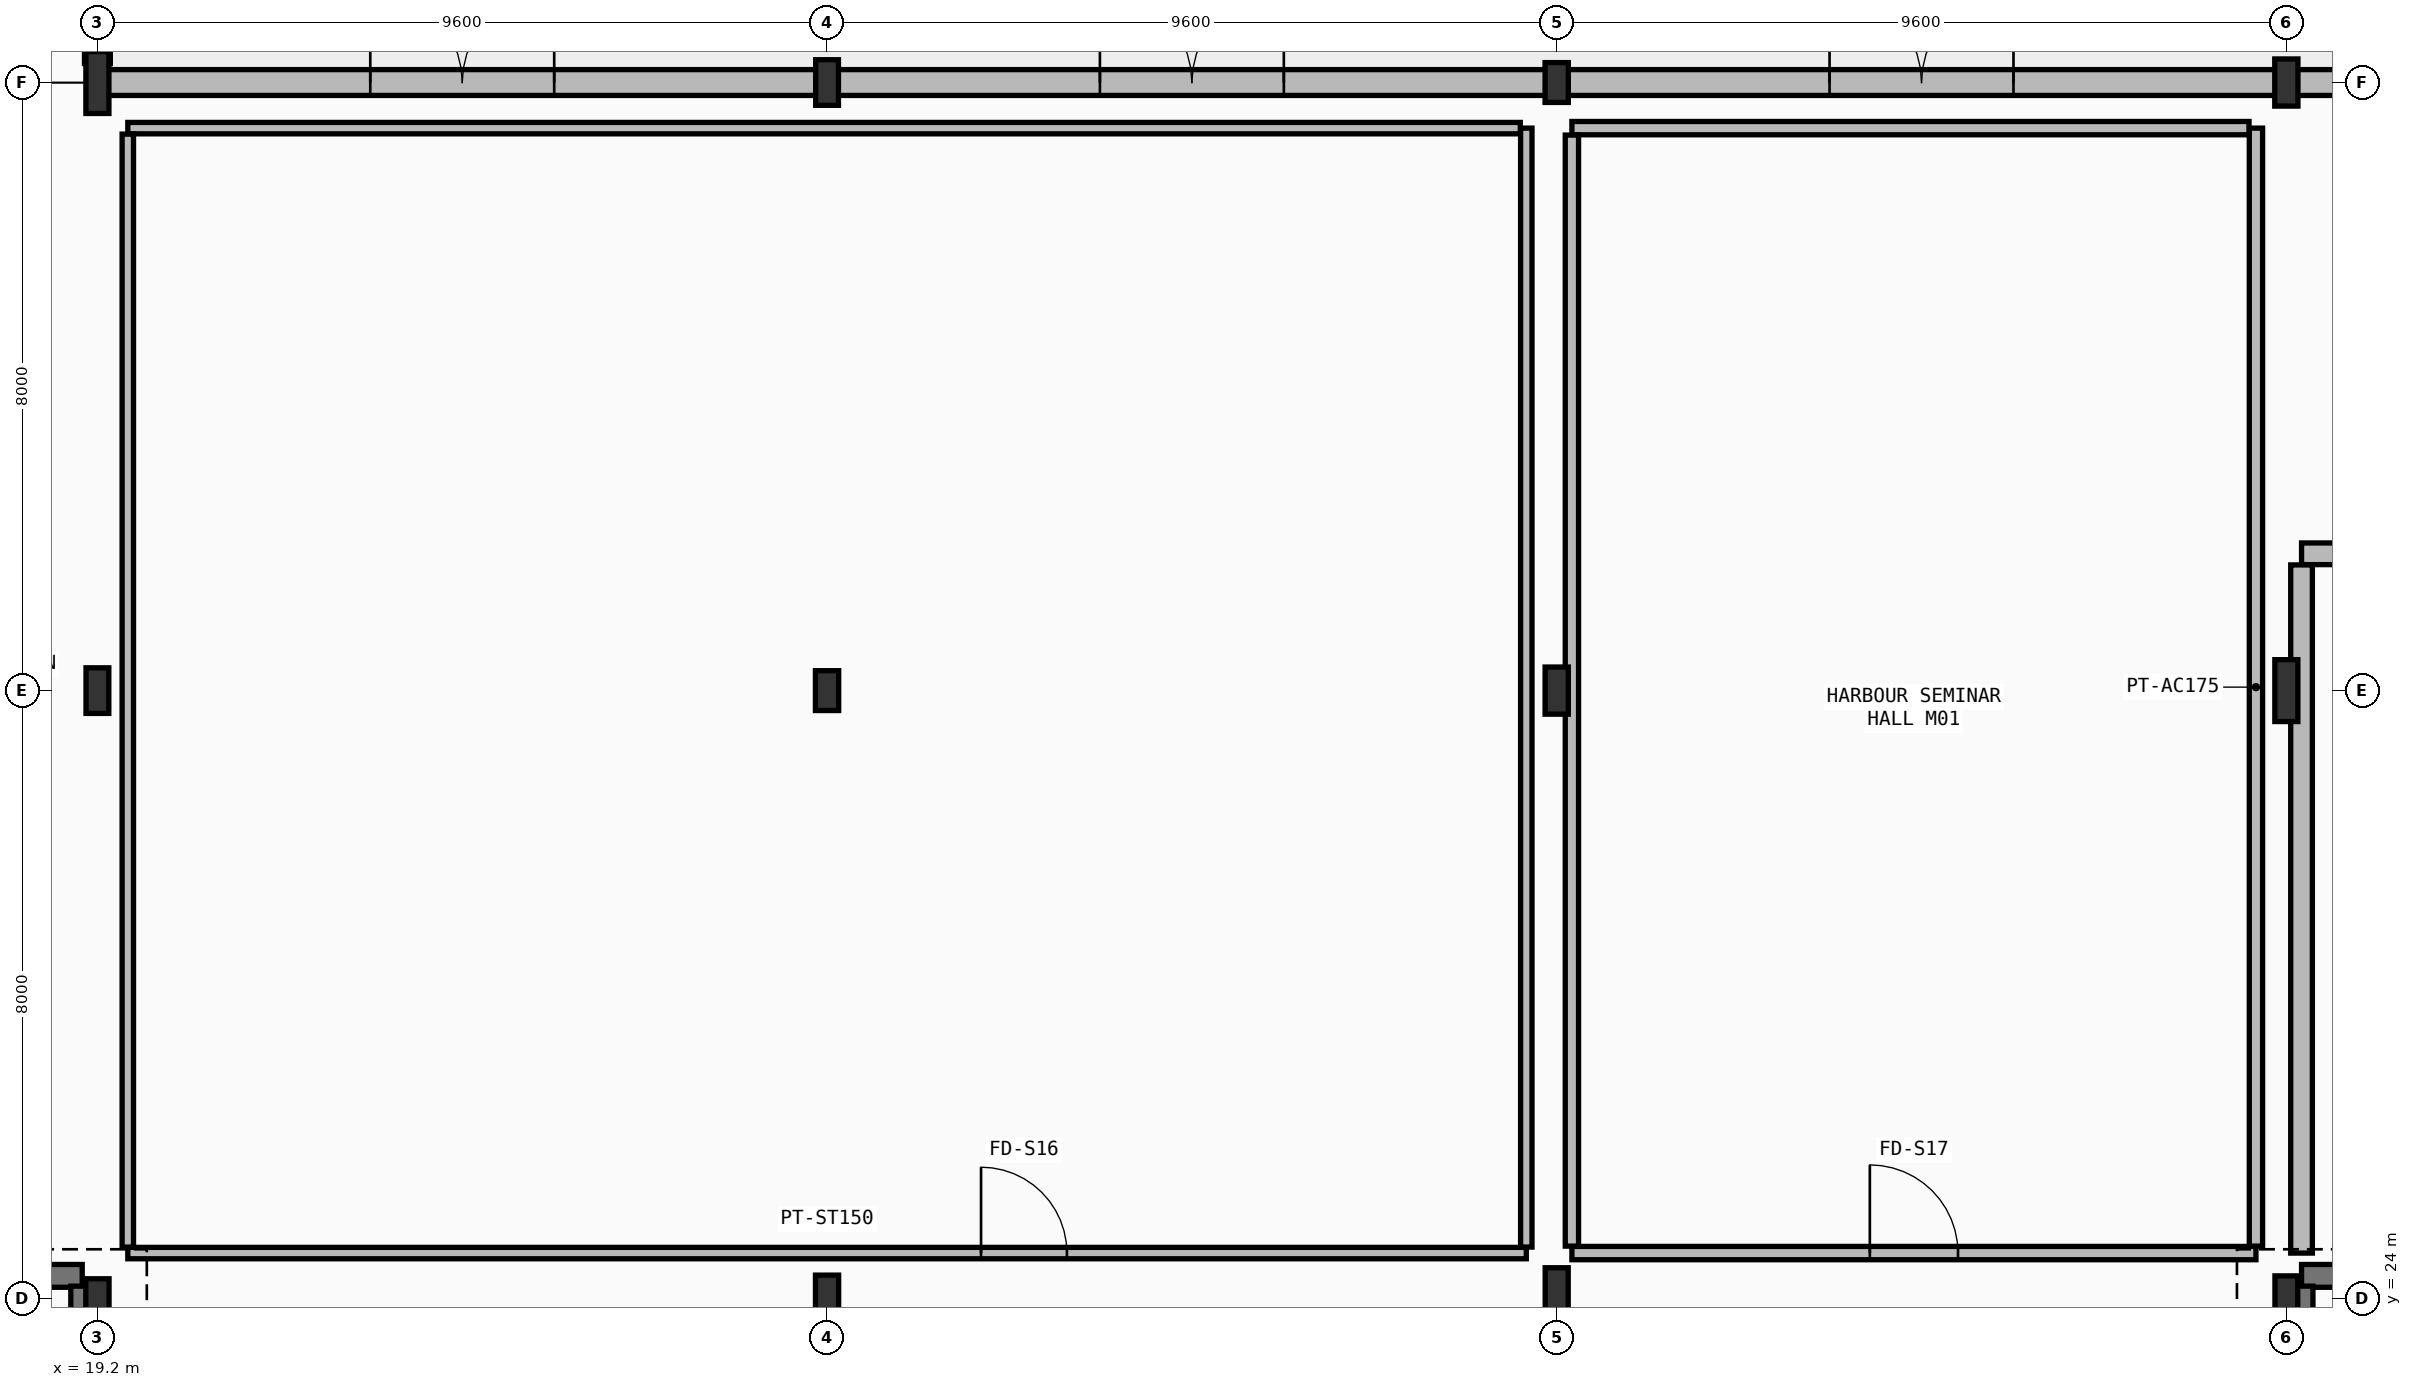
"""IFC4 building model, lengths in metres.
Left out: names, types, materials, properties, quantities, classifications, styles, units other than length and angle.
Written with IfcOpenShell. Run it as: python <this file> out.ifc"""

import sys

from ifc_helpers import new_model, si_unit, direction, frame, frame_2d, origin, origin_2d, place, context, subcontext, project, spatial, rectangle, i_section, extrude, element, fill, save


model = new_model("IFC4")
c1 = context("Model", 3, precision=1e-05, world=origin(), true_north=direction((0.0, 1.0)))
c2 = subcontext(c1, "Body", "Model", "MODEL_VIEW")
j1 = project(units=[si_unit("LENGTHUNIT", "METRE"), si_unit("PLANEANGLEUNIT", "RADIAN")], contexts=[c1])
p1 = place(None, origin())
s1 = spatial("IfcSite", under=j1, at=p1, CompositionType="ELEMENT")
p2 = place(p1, origin())
s2 = spatial("IfcBuilding", under=s1, at=p2, CompositionType="ELEMENT")
p3 = place(p2, origin())
s3 = spatial("IfcBuildingStorey", under=s2, at=p3, CompositionType="ELEMENT", Elevation=0.0)
p4 = place(p3, frame((19.2, 24.0, 0.0), z_axis=(0.0, 0.0, 1.0), x_axis=(1.0, 0.0, 0.0)))
e1 = element("IfcColumn", 1, at=p4, inside=s3, PredefinedType="COLUMN", context=c2, shape_type="SweptSolid", body=[
    extrude(i_section(OverallWidth=0.306, OverallDepth=0.524, WebThickness=0.021, FlangeThickness=0.04, FilletRadius=0.027, at=origin_2d()), origin(), (0.0, 0.0, 1.0), 6.0),
])
p5 = place(p3, frame((19.2, 32.0, 0.0), z_axis=(0.0, 0.0, 1.0), x_axis=(1.0, 0.0, 0.0)))
e2 = element("IfcColumn", 2, at=p5, inside=s3, PredefinedType="COLUMN", context=c2, shape_type="SweptSolid", body=[
    extrude(i_section(OverallWidth=0.3, OverallDepth=0.6, WebThickness=0.015, FlangeThickness=0.03, FilletRadius=0.027, at=origin_2d()), origin(), (0.0, 0.0, 1.0), 6.0),
])
p6 = place(p3, frame((19.2, 40.0, 0.0), z_axis=(0.0, 0.0, 1.0), x_axis=(1.0, 0.0, 0.0)))
e3 = element("IfcColumn", 3, at=p6, inside=s3, PredefinedType="COLUMN", context=c2, shape_type="SweptSolid", body=[
    extrude(i_section(OverallWidth=0.303, OverallDepth=0.814, WebThickness=0.021, FlangeThickness=0.04, FilletRadius=0.03, at=origin_2d()), origin(), (0.0, 0.0, 1.0), 6.0),
])
p7 = place(p3, frame((28.8, 24.0, 0.0), z_axis=(0.0, 0.0, 1.0), x_axis=(1.0, 0.0, 0.0)))
e4 = element("IfcColumn", 4, at=p7, inside=s3, PredefinedType="COLUMN", context=c2, shape_type="SweptSolid", body=[
    extrude(i_section(OverallWidth=0.305, OverallDepth=0.62, WebThickness=0.021, FlangeThickness=0.04, FilletRadius=0.027, at=origin_2d()), origin(), (0.0, 0.0, 1.0), 6.0),
])
p8 = place(p3, frame((28.8, 32.0, 0.0), z_axis=(0.0, 0.0, 1.0), x_axis=(1.0, 0.0, 0.0)))
e5 = element("IfcColumn", 5, at=p8, inside=s3, PredefinedType="COLUMN", context=c2, shape_type="SweptSolid", body=[
    extrude(i_section(OverallWidth=0.306, OverallDepth=0.524, WebThickness=0.021, FlangeThickness=0.04, FilletRadius=0.027, at=origin_2d()), origin(), (0.0, 0.0, 1.0), 6.0),
])
p9 = place(p3, frame((28.8, 40.0, 0.0), z_axis=(0.0, 0.0, 1.0), x_axis=(1.0, 0.0, 0.0)))
e6 = element("IfcColumn", 6, at=p9, inside=s3, PredefinedType="COLUMN", context=c2, shape_type="SweptSolid", body=[
    extrude(i_section(OverallWidth=0.3, OverallDepth=0.6, WebThickness=0.015, FlangeThickness=0.03, FilletRadius=0.027, at=origin_2d()), origin(), (0.0, 0.0, 1.0), 6.0),
])
p10 = place(p3, frame((38.4, 24.0, 0.0), z_axis=(0.0, 0.0, 1.0), x_axis=(1.0, 0.0, 0.0)))
e7 = element("IfcColumn", 7, at=p10, inside=s3, PredefinedType="COLUMN", context=c2, shape_type="SweptSolid", body=[
    extrude(i_section(OverallWidth=0.303, OverallDepth=0.814, WebThickness=0.021, FlangeThickness=0.04, FilletRadius=0.03, at=origin_2d()), origin(), (0.0, 0.0, 1.0), 6.0),
])
p11 = place(p3, frame((38.4, 32.0, 0.0), z_axis=(0.0, 0.0, 1.0), x_axis=(1.0, 0.0, 0.0)))
e8 = element("IfcColumn", 8, at=p11, inside=s3, PredefinedType="COLUMN", context=c2, shape_type="SweptSolid", body=[
    extrude(i_section(OverallWidth=0.305, OverallDepth=0.62, WebThickness=0.021, FlangeThickness=0.04, FilletRadius=0.027, at=origin_2d()), origin(), (0.0, 0.0, 1.0), 6.0),
])
p12 = place(p3, frame((38.4, 40.0, 0.0), z_axis=(0.0, 0.0, 1.0), x_axis=(1.0, 0.0, 0.0)))
e9 = element("IfcColumn", 9, at=p12, inside=s3, PredefinedType="COLUMN", context=c2, shape_type="SweptSolid", body=[
    extrude(i_section(OverallWidth=0.306, OverallDepth=0.524, WebThickness=0.021, FlangeThickness=0.04, FilletRadius=0.027, at=origin_2d()), origin(), (0.0, 0.0, 1.0), 6.0),
])
p13 = place(p3, frame((48.0, 24.0, 0.0), z_axis=(0.0, 0.0, 1.0), x_axis=(1.0, 0.0, 0.0)))
e10 = element("IfcColumn", 10, at=p13, inside=s3, PredefinedType="COLUMN", context=c2, shape_type="SweptSolid", body=[
    extrude(i_section(OverallWidth=0.3, OverallDepth=0.6, WebThickness=0.015, FlangeThickness=0.03, FilletRadius=0.027, at=origin_2d()), origin(), (0.0, 0.0, 1.0), 6.0),
])
p14 = place(p3, frame((48.0, 32.0, 0.0), z_axis=(0.0, 0.0, 1.0), x_axis=(1.0, 0.0, 0.0)))
e11 = element("IfcColumn", 11, at=p14, inside=s3, PredefinedType="COLUMN", context=c2, shape_type="SweptSolid", body=[
    extrude(i_section(OverallWidth=0.303, OverallDepth=0.814, WebThickness=0.021, FlangeThickness=0.04, FilletRadius=0.03, at=origin_2d()), origin(), (0.0, 0.0, 1.0), 6.0),
])
p15 = place(p3, frame((48.0, 40.0, 0.0), z_axis=(0.0, 0.0, 1.0), x_axis=(1.0, 0.0, 0.0)))
e12 = element("IfcColumn", 12, at=p15, inside=s3, PredefinedType="COLUMN", context=c2, shape_type="SweptSolid", body=[
    extrude(i_section(OverallWidth=0.305, OverallDepth=0.62, WebThickness=0.021, FlangeThickness=0.04, FilletRadius=0.027, at=origin_2d()), origin(), (0.0, 0.0, 1.0), 6.0),
])
p16 = place(p3, frame((19.2, 40.0, 0.0), z_axis=(0.0, 0.0, 1.0), x_axis=(1.0, 0.0, 0.0)))
e13 = element("IfcWall", 13, at=p16, inside=s3, PredefinedType="SOLIDWALL", context=c2, shape_type="SweptSolid", body=[
    extrude(rectangle(XDim=9.6, YDim=0.34, at=frame_2d((4.8, 0.0))), origin(), (0.0, 0.0, 1.0), 5.14),
])
p17 = place(p16, frame((3.59, 0.0, 0.0)))
e14 = element("IfcOpeningElement", 14, at=p17, cuts=e13, PredefinedType="OPENING", context=c2, shape_type="SweptSolid", body=[
    extrude(rectangle(XDim=2.42, YDim=2.46, at=frame_2d((1.21, 1.23))), frame((0.0, 0.18, 0.0), z_axis=(0.0, -1.0, 0.0), x_axis=(1.0, 0.0, 0.0)), (0.0, 0.0, 1.0), 0.36),
])
p18 = place(p3, frame((28.8, 40.0, 0.0), z_axis=(0.0, 0.0, 1.0), x_axis=(1.0, 0.0, 0.0)))
e15 = element("IfcWall", 15, at=p18, inside=s3, PredefinedType="SOLIDWALL", context=c2, shape_type="SweptSolid", body=[
    extrude(rectangle(XDim=9.6, YDim=0.34, at=frame_2d((4.8, 0.0))), origin(), (0.0, 0.0, 1.0), 4.94),
])
p19 = place(p18, frame((3.59, 0.0, 0.0)))
e16 = element("IfcOpeningElement", 16, at=p19, cuts=e15, PredefinedType="OPENING", context=c2, shape_type="SweptSolid", body=[
    extrude(rectangle(XDim=2.42, YDim=2.46, at=frame_2d((1.21, 1.23))), frame((0.0, 0.18, 0.0), z_axis=(0.0, -1.0, 0.0), x_axis=(1.0, 0.0, 0.0)), (0.0, 0.0, 1.0), 0.36),
])
p20 = place(p3, frame((38.4, 40.0, 0.0), z_axis=(0.0, 0.0, 1.0), x_axis=(1.0, 0.0, 0.0)))
e17 = element("IfcWall", 17, at=p20, inside=s3, PredefinedType="SOLIDWALL", context=c2, shape_type="SweptSolid", body=[
    extrude(rectangle(XDim=9.6, YDim=0.34, at=frame_2d((4.8, 0.0))), origin(), (0.0, 0.0, 1.0), 5.09),
])
p21 = place(p20, frame((3.59, 0.0, 0.0)))
e18 = element("IfcOpeningElement", 18, at=p21, cuts=e17, PredefinedType="OPENING", context=c2, shape_type="SweptSolid", body=[
    extrude(rectangle(XDim=2.42, YDim=2.46, at=frame_2d((1.21, 1.23))), frame((0.0, 0.18, 0.0), z_axis=(0.0, -1.0, 0.0), x_axis=(1.0, 0.0, 0.0)), (0.0, 0.0, 1.0), 0.36),
])
p22 = place(p3, frame((48.0, 40.0, 0.0), z_axis=(0.0, 0.0, 1.0), x_axis=(1.0, 0.0, 0.0)))
e19 = element("IfcWall", 19, at=p22, inside=s3, PredefinedType="SOLIDWALL", context=c2, shape_type="SweptSolid", body=[
    extrude(rectangle(XDim=9.6, YDim=0.34, at=frame_2d((4.8, 0.0))), origin(), (0.0, 0.0, 1.0), 4.84),
])
p23 = place(p22, frame((3.59, 0.0, 0.0)))
e20 = element("IfcOpeningElement", 20, at=p23, cuts=e19, PredefinedType="OPENING", context=c2, shape_type="SweptSolid", body=[
    extrude(rectangle(XDim=2.42, YDim=2.46, at=frame_2d((1.21, 1.23))), frame((0.0, 0.18, 0.0), z_axis=(0.0, -1.0, 0.0), x_axis=(1.0, 0.0, 0.0)), (0.0, 0.0, 1.0), 0.36),
])
p24 = place(p3, frame((19.0, 24.3, 0.0), z_axis=(0.0, 0.0, 1.0), x_axis=(-1.0, 0.0, 0.0)))
e21 = element("IfcWall", 21, at=p24, inside=s3, PredefinedType="SHEAR", context=c2, shape_type="SweptSolid", body=[
    extrude(rectangle(XDim=2.6, YDim=0.3, at=frame_2d((1.3, 0.0))), origin(), (0.0, 0.0, 1.0), 5.77),
])
p25 = place(p3, frame((19.0, 21.665, 0.0), z_axis=(0.0, 0.0, 1.0), x_axis=(0.0, 1.0, 0.0)))
e22 = element("IfcWall", 22, at=p25, inside=s3, PredefinedType="SHEAR", context=c2, shape_type="SweptSolid", body=[
    extrude(rectangle(XDim=2.5, YDim=0.3, at=frame_2d((1.25, 0.0))), origin(), (0.0, 0.0, 1.0), 5.77),
])
p26 = place(p3, frame((50.8, 24.3, 0.0), z_axis=(0.0, 0.0, 1.0), x_axis=(-1.0, 0.0, 0.0)))
e23 = element("IfcWall", 23, at=p26, inside=s3, PredefinedType="SHEAR", context=c2, shape_type="SweptSolid", body=[
    extrude(rectangle(XDim=2.6, YDim=0.3, at=frame_2d((1.3, 0.0))), origin(), (0.0, 0.0, 1.0), 5.77),
])
p27 = place(p3, frame((48.2, 24.165, 0.0), z_axis=(0.0, 0.0, 1.0), x_axis=(0.0, -1.0, 0.0)))
e24 = element("IfcWall", 24, at=p27, inside=s3, PredefinedType="SHEAR", context=c2, shape_type="SweptSolid", body=[
    extrude(rectangle(XDim=2.33, YDim=0.3, at=frame_2d((1.165, 0.0))), origin(), (0.0, 0.0, 1.0), 5.77),
])
p28 = place(p3, frame((19.6, 24.6, 0.0), z_axis=(0.0, 0.0, 1.0), x_axis=(1.0, 0.0, 0.0)))
e25 = element("IfcWall", 25, at=p28, inside=s3, PredefinedType="PARTITIONING", context=c2, shape_type="SweptSolid", body=[
    extrude(rectangle(XDim=18.4, YDim=0.15, at=frame_2d((9.2, 0.0))), origin(), (0.0, 0.0, 1.0), 5.14),
])
p29 = place(p28, frame((11.226, 0.0, 0.0)))
e26 = element("IfcOpeningElement", 26, at=p29, cuts=e25, PredefinedType="OPENING", context=c2, shape_type="SweptSolid", body=[
    extrude(rectangle(XDim=1.13, YDim=2.3, at=frame_2d((0.565, 1.15))), frame((0.0, 0.085, 0.0), z_axis=(0.0, -1.0, 0.0), x_axis=(1.0, 0.0, 0.0)), (0.0, 0.0, 1.0), 0.17),
])
p30 = place(p3, frame((38.0, 24.679, 0.0), z_axis=(0.0, 0.0, 1.0), x_axis=(0.0, 1.0, 0.0)))
e27 = element("IfcWall", 27, at=p30, inside=s3, PredefinedType="PARTITIONING", context=c2, shape_type="SweptSolid", body=[
    extrude(rectangle(XDim=14.721, YDim=0.15, at=frame_2d((7.36, 0.0))), origin(), (0.0, 0.0, 1.0), 5.14),
])
p31 = place(p3, frame((37.921, 39.4, 0.0), z_axis=(0.0, 0.0, 1.0), x_axis=(-1.0, 0.0, 0.0)))
e28 = element("IfcWall", 28, at=p31, inside=s3, PredefinedType="PARTITIONING", context=c2, shape_type="SweptSolid", body=[
    extrude(rectangle(XDim=18.321, YDim=0.15, at=frame_2d((9.16, 0.0))), origin(), (0.0, 0.0, 1.0), 5.24),
])
p32 = place(p3, frame((19.6, 39.321, 0.0), z_axis=(0.0, 0.0, 1.0), x_axis=(0.0, -1.0, 0.0)))
e29 = element("IfcWall", 29, at=p32, inside=s3, PredefinedType="PARTITIONING", context=c2, shape_type="SweptSolid", body=[
    extrude(rectangle(XDim=14.642, YDim=0.15, at=frame_2d((7.321, 0.0))), origin(), (0.0, 0.0, 1.0), 5.35),
])
p33 = place(p3, frame((38.6, 24.6, 0.0), z_axis=(0.0, 0.0, 1.0), x_axis=(1.0, 0.0, 0.0)))
e30 = element("IfcWall", 30, at=p33, inside=s3, PredefinedType="PARTITIONING", context=c2, shape_type="SweptSolid", body=[
    extrude(rectangle(XDim=9.0, YDim=0.175, at=frame_2d((4.5, 0.0))), origin(), (0.0, 0.0, 1.0), 5.77),
])
p34 = place(p33, frame((3.92, 0.0, 0.0)))
e31 = element("IfcOpeningElement", 31, at=p34, cuts=e30, PredefinedType="OPENING", context=c2, shape_type="SweptSolid", body=[
    extrude(rectangle(XDim=1.16, YDim=2.32, at=frame_2d((0.58, 1.16))), frame((0.0, 0.097, 0.0), z_axis=(0.0, -1.0, 0.0), x_axis=(1.0, 0.0, 0.0)), (0.0, 0.0, 1.0), 0.195),
])
p35 = place(p3, frame((47.6, 24.691, 0.0), z_axis=(0.0, 0.0, 1.0), x_axis=(0.0, 1.0, 0.0)))
e32 = element("IfcWall", 32, at=p35, inside=s3, PredefinedType="PARTITIONING", context=c2, shape_type="SweptSolid", body=[
    extrude(rectangle(XDim=14.708, YDim=0.175, at=frame_2d((7.354, 0.0))), origin(), (0.0, 0.0, 1.0), 5.19),
])
p36 = place(p3, frame((47.509, 39.4, 0.0), z_axis=(0.0, 0.0, 1.0), x_axis=(-1.0, 0.0, 0.0)))
e33 = element("IfcWall", 33, at=p36, inside=s3, PredefinedType="PARTITIONING", context=c2, shape_type="SweptSolid", body=[
    extrude(rectangle(XDim=8.908, YDim=0.175, at=frame_2d((4.454, 0.0))), origin(), (0.0, 0.0, 1.0), 5.77),
])
p37 = place(p3, frame((38.6, 39.309, 0.0), z_axis=(0.0, 0.0, 1.0), x_axis=(0.0, -1.0, 0.0)))
e34 = element("IfcWall", 34, at=p37, inside=s3, PredefinedType="PARTITIONING", context=c2, shape_type="SweptSolid", body=[
    extrude(rectangle(XDim=14.617, YDim=0.175, at=frame_2d((7.309, 0.0))), origin(), (0.0, 0.0, 1.0), 5.14),
])
p38 = place(p3, frame((54.4, 33.8, 0.0), z_axis=(0.0, 0.0, 1.0), x_axis=(-1.0, 0.0, 0.0)))
e35 = element("IfcWall", 35, at=p38, inside=s3, PredefinedType="PLUMBINGWALL", context=c2, shape_type="SweptSolid", body=[
    extrude(rectangle(XDim=6.2, YDim=0.285, at=frame_2d((3.1, 0.0))), origin(), (0.0, 0.0, 1.0), 5.77),
])
p39 = place(p38, frame((2.615, 0.0, 0.0)))
e36 = element("IfcOpeningElement", 36, at=p39, cuts=e35, PredefinedType="OPENING", context=c2, shape_type="SweptSolid", body=[
    extrude(rectangle(XDim=0.97, YDim=2.1, at=frame_2d((0.485, 1.05))), frame((0.0, 0.152, 0.0), z_axis=(0.0, -1.0, 0.0), x_axis=(1.0, 0.0, 0.0)), (0.0, 0.0, 1.0), 0.305),
])
p40 = place(p3, frame((48.2, 33.654, 0.0), z_axis=(0.0, 0.0, 1.0), x_axis=(0.0, -1.0, 0.0)))
e37 = element("IfcWall", 37, at=p40, inside=s3, PredefinedType="PLUMBINGWALL", context=c2, shape_type="SweptSolid", body=[
    extrude(rectangle(XDim=9.053, YDim=0.285, at=frame_2d((4.527, 0.0))), origin(), (0.0, 0.0, 1.0), 5.14),
])
p41 = place(p3, frame((19.2, 55.75, 0.0), z_axis=(0.0, 0.0, 1.0), x_axis=(0.0, -1.0, 0.0)))
e38 = element("IfcWall", 38, at=p41, inside=s3, PredefinedType="SOLIDWALL", context=c2, shape_type="SweptSolid", body=[
    extrude(rectangle(XDim=15.5, YDim=0.34, at=frame_2d((7.75, 0.0))), origin(), (0.0, 0.0, 1.0), 5.14),
])
p42 = place(p41, frame((9.305, 0.0, 0.0)))
e39 = element("IfcOpeningElement", 39, at=p42, cuts=e38, PredefinedType="OPENING", context=c2, shape_type="SweptSolid", body=[
    extrude(rectangle(XDim=1.09, YDim=2.22, at=frame_2d((0.545, 1.11))), frame((0.0, 0.18, 0.0), z_axis=(0.0, -1.0, 0.0), x_axis=(1.0, 0.0, 0.0)), (0.0, 0.0, 1.0), 0.36),
])
p43 = place(p17, origin())
e40 = element("IfcDoor", 40, at=p43, inside=s3, OperationType="DOUBLE_DOOR_SINGLE_SWING", PredefinedType="DOOR", context=c2, shape_type="SweptSolid", body=[
    extrude(rectangle(XDim=2.42, YDim=2.46, at=frame_2d((1.21, 1.23))), frame((0.0, 0.025, 0.0), z_axis=(0.0, -1.0, 0.0), x_axis=(1.0, 0.0, 0.0)), (0.0, 0.0, 1.0), 0.05),
])
fill(e14, e40)
p44 = place(p19, origin())
e41 = element("IfcDoor", 41, at=p44, inside=s3, OperationType="DOUBLE_DOOR_SINGLE_SWING", PredefinedType="DOOR", context=c2, shape_type="SweptSolid", body=[
    extrude(rectangle(XDim=2.42, YDim=2.46, at=frame_2d((1.21, 1.23))), frame((0.0, 0.025, 0.0), z_axis=(0.0, -1.0, 0.0), x_axis=(1.0, 0.0, 0.0)), (0.0, 0.0, 1.0), 0.05),
])
fill(e16, e41)
p45 = place(p21, origin())
e42 = element("IfcDoor", 42, at=p45, inside=s3, OperationType="DOUBLE_DOOR_SINGLE_SWING", PredefinedType="DOOR", context=c2, shape_type="SweptSolid", body=[
    extrude(rectangle(XDim=2.42, YDim=2.46, at=frame_2d((1.21, 1.23))), frame((0.0, 0.025, 0.0), z_axis=(0.0, -1.0, 0.0), x_axis=(1.0, 0.0, 0.0)), (0.0, 0.0, 1.0), 0.05),
])
fill(e18, e42)
p46 = place(p29, origin())
e43 = element("IfcDoor", 43, at=p46, inside=s3, OperationType="SINGLE_SWING_RIGHT", PredefinedType="DOOR", context=c2, shape_type="SweptSolid", body=[
    extrude(rectangle(XDim=1.13, YDim=2.3, at=frame_2d((0.565, 1.15))), frame((0.0, 0.025, 0.0), z_axis=(0.0, -1.0, 0.0), x_axis=(1.0, 0.0, 0.0)), (0.0, 0.0, 1.0), 0.05),
])
fill(e26, e43)
p47 = place(p34, origin())
e44 = element("IfcDoor", 44, at=p47, inside=s3, OperationType="SINGLE_SWING_LEFT", PredefinedType="DOOR", context=c2, shape_type="SweptSolid", body=[
    extrude(rectangle(XDim=1.16, YDim=2.32, at=frame_2d((0.58, 1.16))), frame((0.0, 0.025, 0.0), z_axis=(0.0, -1.0, 0.0), x_axis=(1.0, 0.0, 0.0)), (0.0, 0.0, 1.0), 0.05),
])
fill(e31, e44)
save(model, sys.argv[1])
